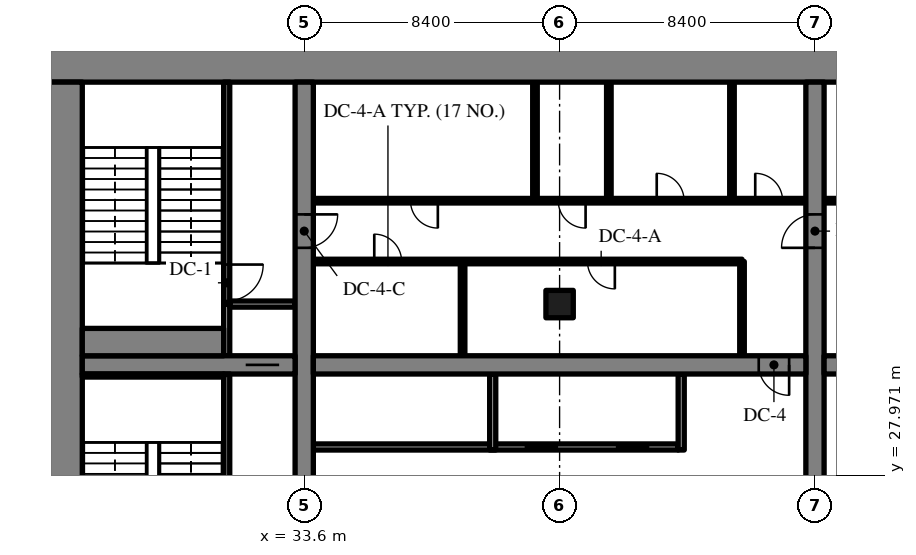
"""IFC4 building model, lengths in metres.
Left out: names, types, materials, properties, quantities, classifications, styles, units other than length and angle.
Written with IfcOpenShell. Run it as: python <this file> out.ifc"""

import sys

from ifc_helpers import new_model, si_unit, direction, frame, frame_2d, origin, origin_2d, place, context, subcontext, project, spatial, rectangle, extrude, source, transform, mapped, element, fill, save


model = new_model("IFC4")
c1 = context("Model", 3, precision=1e-05, world=origin(), true_north=direction((0.0, 1.0)))
c2 = subcontext(c1, "Body", "Model", "MODEL_VIEW")
j1 = project(units=[si_unit("LENGTHUNIT", "METRE"), si_unit("PLANEANGLEUNIT", "RADIAN")], contexts=[c1])
p1 = place(None, origin())
s1 = spatial("IfcSite", under=j1, at=p1, CompositionType="ELEMENT")
p2 = place(p1, origin())
s2 = spatial("IfcBuilding", under=s1, at=p2, CompositionType="ELEMENT")
p3 = place(p2, frame((0.0, 0.0, -4.5)))
s3 = spatial("IfcBuildingStorey", under=s2, at=p3, CompositionType="ELEMENT", Elevation=-4.5)
m1 = source(origin(), c2, "Body", "SweptSolid", [
    extrude(rectangle(XDim=50.4, YDim=1.1, at=frame_2d((25.2, 0.0))), origin(), (0.0, 0.0, 1.0), 4.22),
])
p4 = place(p3, frame((25.2, 41.45, 0.0), z_axis=(0.0, 0.0, 1.0), x_axis=(1.0, 0.0, 0.0)))
e1 = element("IfcWall", 1, at=p4, inside=s3, PredefinedType="SHEAR", context=c2, shape_type="MappedRepresentation", body=[
    mapped(m1, transform((0.0, 0.0, 0.0), scale=1.0)),
])
m2 = source(origin(), c2, "Body", "SweptSolid", [
    extrude(rectangle(XDim=17.8, YDim=1.1, at=frame_2d((8.9, 0.0))), origin(), (0.0, 0.0, 1.0), 4.22),
])
p5 = place(p3, frame((25.75, 23.1, 0.0), z_axis=(0.0, 0.0, 1.0), x_axis=(0.0, 1.0, 0.0)))
e2 = element("IfcWall", 2, at=p5, inside=s3, PredefinedType="SHEAR", context=c2, shape_type="MappedRepresentation", body=[
    mapped(m2, transform((0.0, 0.0, 0.0), scale=1.0)),
])
m3 = source(origin(), c2, "Body", "SweptSolid", [
    extrude(rectangle(XDim=17.8, YDim=0.6, at=frame_2d((8.9, 0.0))), origin(), (0.0, 0.0, 1.0), 4.22),
])
p6 = place(p3, frame((33.6, 23.1, 0.0), z_axis=(0.0, 0.0, 1.0), x_axis=(0.0, 1.0, 0.0)))
e3 = element("IfcWall", 3, at=p6, inside=s3, PredefinedType="SHEAR", context=c2, shape_type="MappedRepresentation", body=[
    mapped(m3, transform((0.0, 0.0, 0.0), scale=1.0)),
])
m4 = source(origin(), c2, "Body", "SweptSolid", [
    extrude(rectangle(XDim=1.1, YDim=2.1, at=frame_2d((0.55, 1.05))), frame((0.0, 0.31, 0.0), z_axis=(0.0, -1.0, 0.0), x_axis=(1.0, 0.0, 0.0)), (0.0, 0.0, 1.0), 0.62),
])
p7 = place(p6, frame((12.35, 0.0, 0.0)))
e4 = element("IfcOpeningElement", 4, at=p7, cuts=e3, PredefinedType="OPENING", context=c2, shape_type="MappedRepresentation", body=[
    mapped(m4, transform((0.0, 0.0, 0.0), scale=1.0)),
])
p8 = place(p3, frame((50.4, 23.1, 0.0), z_axis=(0.0, 0.0, 1.0), x_axis=(0.0, 1.0, 0.0)))
e5 = element("IfcWall", 5, at=p8, inside=s3, PredefinedType="SHEAR", context=c2, shape_type="MappedRepresentation", body=[
    mapped(m3, transform((0.0, 0.0, 0.0), scale=1.0)),
])
p9 = place(p8, frame((12.35, 0.0, 0.0)))
e6 = element("IfcOpeningElement", 6, at=p9, cuts=e5, PredefinedType="OPENING", context=c2, shape_type="MappedRepresentation", body=[
    mapped(m4, transform((0.0, 0.0, 0.0), scale=1.0)),
])
m5 = source(origin(), c2, "Body", "SweptSolid", [
    extrude(rectangle(XDim=7.0, YDim=0.6, at=frame_2d((3.5, 0.0))), origin(), (0.0, 0.0, 1.0), 4.22),
])
p10 = place(p3, frame((26.3, 31.6, 0.0), z_axis=(0.0, 0.0, 1.0), x_axis=(1.0, 0.0, 0.0)))
e7 = element("IfcWall", 7, at=p10, inside=s3, PredefinedType="SHEAR", context=c2, shape_type="MappedRepresentation", body=[
    mapped(m5, transform((0.0, 0.0, 0.0), scale=1.0)),
])
p11 = place(p10, frame((5.375, 0.0, 0.0)))
e8 = element("IfcOpeningElement", 8, at=p11, cuts=e7, PredefinedType="OPENING", context=c2, shape_type="MappedRepresentation", body=[
    mapped(m4, transform((0.0, 0.0, 0.0), scale=1.0)),
])
m6 = source(origin(), c2, "Body", "SweptSolid", [
    extrude(rectangle(XDim=16.2, YDim=0.6, at=frame_2d((8.1, 0.0))), origin(), (0.0, 0.0, 1.0), 4.22),
])
p12 = place(p3, frame((33.9, 31.6, 0.0), z_axis=(0.0, 0.0, 1.0), x_axis=(1.0, 0.0, 0.0)))
e9 = element("IfcWall", 9, at=p12, inside=s3, PredefinedType="SHEAR", context=c2, shape_type="MappedRepresentation", body=[
    mapped(m6, transform((0.0, 0.0, 0.0), scale=1.0)),
])
m7 = source(origin(), c2, "Body", "SweptSolid", [
    extrude(rectangle(XDim=1.0, YDim=2.1, at=frame_2d((0.5, 1.05))), frame((0.0, 0.31, 0.0), z_axis=(0.0, -1.0, 0.0), x_axis=(1.0, 0.0, 0.0)), (0.0, 0.0, 1.0), 0.62),
])
p13 = place(p12, frame((14.65, 0.0, 0.0)))
e10 = element("IfcOpeningElement", 10, at=p13, cuts=e9, PredefinedType="OPENING", context=c2, shape_type="MappedRepresentation", body=[
    mapped(m7, transform((0.0, 0.0, 0.0), scale=1.0)),
])
m8 = source(origin(), c2, "Body", "SweptSolid", [
    extrude(rectangle(XDim=16.2, YDim=0.6, at=frame_2d((8.1, 0.0))), origin(), (0.0, 0.0, 1.0), 4.22),
])
p14 = place(p3, frame((50.7, 31.6, 0.0), z_axis=(0.0, 0.0, 1.0), x_axis=(1.0, 0.0, 0.0)))
e11 = element("IfcWall", 11, at=p14, inside=s3, PredefinedType="SHEAR", context=c2, shape_type="MappedRepresentation", body=[
    mapped(m8, transform((0.0, 0.0, 0.0), scale=1.0)),
])
p15 = place(p14, frame((0.55, 0.0, 0.0)))
e12 = element("IfcOpeningElement", 12, at=p15, cuts=e11, PredefinedType="OPENING", context=c2, shape_type="MappedRepresentation", body=[
    mapped(m7, transform((0.0, 0.0, 0.0), scale=1.0)),
])
m9 = source(origin(), c2, "Body", "SweptSolid", [
    extrude(rectangle(XDim=0.9, YDim=0.9, at=origin_2d()), origin(), (0.0, 0.0, 1.0), 4.22),
])
p16 = place(p3, frame((42.0, 33.6, 0.0), z_axis=(0.0, 0.0, 1.0), x_axis=(1.0, 0.0, 0.0)))
e13 = element("IfcColumn", 13, at=p16, inside=s3, PredefinedType="COLUMN", context=c2, shape_type="MappedRepresentation", body=[
    mapped(m9, transform((0.0, 0.0, 0.0), scale=1.0)),
])
m10 = source(origin(), c2, "Body", "SweptSolid", [
    extrude(rectangle(XDim=12.0, YDim=0.2, at=frame_2d((6.0, 0.0))), origin(), (0.0, 0.0, 1.0), 4.22),
])
p17 = place(p3, frame((33.9, 28.9, 0.0), z_axis=(0.0, 0.0, 1.0), x_axis=(1.0, 0.0, 0.0)))
e14 = element("IfcWall", 14, at=p17, inside=s3, PredefinedType="SOLIDWALL", context=c2, shape_type="MappedRepresentation", body=[
    mapped(m10, transform((0.0, 0.0, 0.0), scale=1.0)),
])
m11 = source(origin(), c2, "Body", "SweptSolid", [
    extrude(rectangle(XDim=1.1, YDim=2.1, at=frame_2d((0.55, 1.05))), frame((0.0, 0.11, 0.0), z_axis=(0.0, -1.0, 0.0), x_axis=(1.0, 0.0, 0.0)), (0.0, 0.0, 1.0), 0.22),
])
p18 = place(p17, frame((6.95, 0.0, 0.0)))
e15 = element("IfcOpeningElement", 15, at=p18, cuts=e14, PredefinedType="OPENING", context=c2, shape_type="MappedRepresentation", body=[
    mapped(m11, transform((0.0, 0.0, 0.0), scale=1.0)),
])
p19 = place(p17, frame((9.95, 0.0, 0.0)))
e16 = element("IfcOpeningElement", 16, at=p19, cuts=e14, PredefinedType="OPENING", context=c2, shape_type="MappedRepresentation", body=[
    mapped(m11, transform((0.0, 0.0, 0.0), scale=1.0)),
])
m12 = source(origin(), c2, "Body", "SweptSolid", [
    extrude(rectangle(XDim=2.5, YDim=0.2, at=frame_2d((1.25, 0.0))), origin(), (0.0, 0.0, 1.0), 4.22),
])
for number, where, z_axis, x_axis in (
    (17, (46.0, 28.8, 0.0), (0.0, 0.0, 1.0), (0.0, 1.0, 0.0)),
    (18, (39.8, 28.8, 0.0), (0.0, 0.0, 1.0), (0.0, 1.0, 0.0)),
):
    element("IfcWall", number, at=place(p3, frame(where, z_axis=z_axis, x_axis=x_axis)), inside=s3, PredefinedType="SOLIDWALL", context=c2, shape_type="MappedRepresentation", body=[
        mapped(m12, transform((0.0, 0.0, 0.0), scale=1.0)),
    ])
m13 = source(origin(), c2, "Body", "SweptSolid", [
    extrude(rectangle(XDim=3.1, YDim=0.15, at=frame_2d((1.55, 0.0))), origin(), (0.0, 0.0, 1.0), 4.22),
])
p20 = place(p3, frame((48.0, 31.9, 0.0), z_axis=(0.0, 0.0, 1.0), x_axis=(0.0, 1.0, 0.0)))
e19 = element("IfcWall", 19, at=p20, inside=s3, PredefinedType="PARTITIONING", context=c2, shape_type="MappedRepresentation", body=[
    mapped(m13, transform((0.0, 0.0, 0.0), scale=1.0)),
])
m14 = source(origin(), c2, "Body", "SweptSolid", [
    extrude(rectangle(XDim=14.1, YDim=0.15, at=frame_2d((7.05, 0.0))), origin(), (0.0, 0.0, 1.0), 4.22),
])
p21 = place(p3, frame((33.9, 35.0, 0.0), z_axis=(0.0, 0.0, 1.0), x_axis=(1.0, 0.0, 0.0)))
e20 = element("IfcWall", 20, at=p21, inside=s3, PredefinedType="PARTITIONING", context=c2, shape_type="MappedRepresentation", body=[
    mapped(m14, transform((0.0, 0.0, 0.0), scale=1.0)),
])
m15 = source(origin(), c2, "Body", "SweptSolid", [
    extrude(rectangle(XDim=0.9, YDim=2.1, at=frame_2d((0.45, 1.05))), frame((0.0, 0.085, 0.0), z_axis=(0.0, -1.0, 0.0), x_axis=(1.0, 0.0, 0.0)), (0.0, 0.0, 1.0), 0.17),
])
p22 = place(p21, frame((2.004, 0.0, 0.0)))
e21 = element("IfcOpeningElement", 21, at=p22, cuts=e20, PredefinedType="OPENING", context=c2, shape_type="MappedRepresentation", body=[
    mapped(m15, transform((0.0, 0.0, 0.0), scale=1.0)),
])
p23 = place(p21, frame((9.017, 0.0, 0.0)))
e22 = element("IfcOpeningElement", 22, at=p23, cuts=e20, PredefinedType="OPENING", context=c2, shape_type="MappedRepresentation", body=[
    mapped(m15, transform((0.0, 0.0, 0.0), scale=1.0)),
])
m16 = source(origin(), c2, "Body", "SweptSolid", [
    extrude(rectangle(XDim=16.2, YDim=0.15, at=frame_2d((8.1, 0.0))), origin(), (0.0, 0.0, 1.0), 4.22),
])
p24 = place(p3, frame((33.9, 37.0, 0.0), z_axis=(0.0, 0.0, 1.0), x_axis=(1.0, 0.0, 0.0)))
e23 = element("IfcWall", 23, at=p24, inside=s3, PredefinedType="PARTITIONING", context=c2, shape_type="MappedRepresentation", body=[
    mapped(m16, transform((0.0, 0.0, 0.0), scale=1.0)),
])
p25 = place(p24, frame((3.195, 0.0, 0.0)))
e24 = element("IfcOpeningElement", 24, at=p25, cuts=e23, PredefinedType="OPENING", context=c2, shape_type="MappedRepresentation", body=[
    mapped(m15, transform((0.0, 0.0, 0.0), scale=1.0)),
])
p26 = place(p24, frame((8.055, 0.0, 0.0)))
e25 = element("IfcOpeningElement", 25, at=p26, cuts=e23, PredefinedType="OPENING", context=c2, shape_type="MappedRepresentation", body=[
    mapped(m15, transform((0.0, 0.0, 0.0), scale=1.0)),
])
p27 = place(p24, frame((11.295, 0.0, 0.0)))
e26 = element("IfcOpeningElement", 26, at=p27, cuts=e23, PredefinedType="OPENING", context=c2, shape_type="MappedRepresentation", body=[
    mapped(m15, transform((0.0, 0.0, 0.0), scale=1.0)),
])
p28 = place(p24, frame((14.535, 0.0, 0.0)))
e27 = element("IfcOpeningElement", 27, at=p28, cuts=e23, PredefinedType="OPENING", context=c2, shape_type="MappedRepresentation", body=[
    mapped(m15, transform((0.0, 0.0, 0.0), scale=1.0)),
])
p29 = place(p3, frame((38.809, 31.9, 0.0), z_axis=(0.0, 0.0, 1.0), x_axis=(0.0, 1.0, 0.0)))
e28 = element("IfcWall", 28, at=p29, inside=s3, PredefinedType="PARTITIONING", context=c2, shape_type="MappedRepresentation", body=[
    mapped(m13, transform((0.0, 0.0, 0.0), scale=1.0)),
])
m17 = source(origin(), c2, "Body", "SweptSolid", [
    extrude(rectangle(XDim=3.9, YDim=0.15, at=frame_2d((1.95, 0.0))), origin(), (0.0, 0.0, 1.0), 4.22),
])
for number, where, z_axis, x_axis in (
    (29, (41.19, 37.0, 0.0), (0.0, 0.0, 1.0), (0.0, 1.0, 0.0)),
    (30, (43.62, 37.0, 0.0), (0.0, 0.0, 1.0), (0.0, 1.0, 0.0)),
    (31, (47.67, 37.0, 0.0), (0.0, 0.0, 1.0), (0.0, 1.0, 0.0)),
):
    element("IfcWall", number, at=place(p3, frame(where, z_axis=z_axis, x_axis=x_axis)), inside=s3, PredefinedType="PARTITIONING", context=c2, shape_type="MappedRepresentation", body=[
        mapped(m17, transform((0.0, 0.0, 0.0), scale=1.0)),
    ])
m18 = source(origin(), c2, "Body", "SweptSolid", [
    extrude(rectangle(XDim=16.2, YDim=0.15, at=frame_2d((8.1, 0.0))), origin(), (0.0, 0.0, 1.0), 4.22),
])
p30 = place(p3, frame((66.9, 37.0, 0.0), z_axis=(0.0, 0.0, 1.0), x_axis=(-1.0, 0.0, 0.0)))
e32 = element("IfcWall", 32, at=p30, inside=s3, PredefinedType="PARTITIONING", context=c2, shape_type="MappedRepresentation", body=[
    mapped(m18, transform((0.0, 0.0, 0.0), scale=1.0)),
])
p31 = place(p30, frame((0.765, 0.0, 0.0)))
e33 = element("IfcOpeningElement", 33, at=p31, cuts=e32, PredefinedType="OPENING", context=c2, shape_type="MappedRepresentation", body=[
    mapped(m15, transform((0.0, 0.0, 0.0), scale=1.0)),
])
p32 = place(p30, frame((3.6, 0.0, 0.0)))
e34 = element("IfcOpeningElement", 34, at=p32, cuts=e32, PredefinedType="OPENING", context=c2, shape_type="MappedRepresentation", body=[
    mapped(m15, transform((0.0, 0.0, 0.0), scale=1.0)),
])
p33 = place(p30, frame((9.27, 0.0, 0.0)))
e35 = element("IfcOpeningElement", 35, at=p33, cuts=e32, PredefinedType="OPENING", context=c2, shape_type="MappedRepresentation", body=[
    mapped(m15, transform((0.0, 0.0, 0.0), scale=1.0)),
])
p34 = place(p30, frame((14.535, 0.0, 0.0)))
e36 = element("IfcOpeningElement", 36, at=p34, cuts=e32, PredefinedType="OPENING", context=c2, shape_type="MappedRepresentation", body=[
    mapped(m15, transform((0.0, 0.0, 0.0), scale=1.0)),
])
m19 = source(origin(), c2, "Body", "SweptSolid", [
    extrude(rectangle(XDim=8.2, YDim=0.2, at=frame_2d((4.1, 0.0))), origin(), (0.0, 0.0, 1.0), 4.22),
])
p35 = place(p3, frame((31.05, 23.1, 0.0), z_axis=(0.0, 0.0, 1.0), x_axis=(0.0, 1.0, 0.0)))
e37 = element("IfcWall", 37, at=p35, inside=s3, PredefinedType="SOLIDWALL", context=c2, shape_type="MappedRepresentation", body=[
    mapped(m19, transform((0.0, 0.0, 0.0), scale=1.0)),
])
m20 = source(origin(), c2, "Body", "SweptSolid", [
    extrude(rectangle(XDim=1.2, YDim=2.1, at=frame_2d((0.6, 1.05))), frame((0.0, 0.11, 0.0), z_axis=(0.0, -1.0, 0.0), x_axis=(1.0, 0.0, 0.0)), (0.0, 0.0, 1.0), 0.22),
])
p36 = place(p35, frame((0.5, 0.0, 0.0)))
e38 = element("IfcOpeningElement", 38, at=p36, cuts=e37, PredefinedType="OPENING", context=c2, shape_type="MappedRepresentation", body=[
    mapped(m20, transform((0.0, 0.0, 0.0), scale=1.0)),
])
m21 = source(origin(), c2, "Body", "SweptSolid", [
    extrude(rectangle(XDim=1.7, YDim=0.2, at=frame_2d((0.85, 0.0))), origin(), (0.0, 0.0, 1.0), 4.22),
])
p37 = place(p3, frame((31.05, 31.9, 0.0), z_axis=(0.0, 0.0, 1.0), x_axis=(0.0, 1.0, 0.0)))
e39 = element("IfcWall", 39, at=p37, inside=s3, PredefinedType="SOLIDWALL", context=c2, shape_type="MappedRepresentation", body=[
    mapped(m21, transform((0.0, 0.0, 0.0), scale=1.0)),
])
m22 = source(origin(), c2, "Body", "SweptSolid", [
    extrude(rectangle(XDim=2.15, YDim=0.2, at=frame_2d((1.075, 0.0))), origin(), (0.0, 0.0, 1.0), 4.22),
])
p38 = place(p3, frame((31.15, 33.6, 0.0), z_axis=(0.0, 0.0, 1.0), x_axis=(1.0, 0.0, 0.0)))
e40 = element("IfcWall", 40, at=p38, inside=s3, PredefinedType="SOLIDWALL", context=c2, shape_type="MappedRepresentation", body=[
    mapped(m22, transform((0.0, 0.0, 0.0), scale=1.0)),
])
m23 = source(origin(), c2, "Body", "SweptSolid", [
    extrude(rectangle(XDim=7.3, YDim=0.2, at=frame_2d((3.65, 0.0))), origin(), (0.0, 0.0, 1.0), 4.22),
])
p39 = place(p3, frame((31.05, 33.6, 0.0), z_axis=(0.0, 0.0, 1.0), x_axis=(0.0, 1.0, 0.0)))
e41 = element("IfcWall", 41, at=p39, inside=s3, PredefinedType="SOLIDWALL", context=c2, shape_type="MappedRepresentation", body=[
    mapped(m23, transform((0.0, 0.0, 0.0), scale=1.0)),
])
p40 = place(p39, frame((0.1, 0.0, 0.0)))
e42 = element("IfcOpeningElement", 42, at=p40, cuts=e41, PredefinedType="OPENING", context=c2, shape_type="MappedRepresentation", body=[
    mapped(m20, transform((0.0, 0.0, 0.0), scale=1.0)),
])
m24 = source(origin(), c2, "Body", "SweptSolid", [
    extrude(rectangle(XDim=4.65, YDim=0.1, at=frame_2d((2.325, 0.0))), origin(), (0.0, 0.0, 1.0), 4.22),
])
p41 = place(p3, frame((26.3, 31.25, 0.0), z_axis=(0.0, 0.0, 1.0), x_axis=(1.0, 0.0, 0.0)))
e43 = element("IfcWall", 43, at=p41, inside=s3, PredefinedType="SOLIDWALL", context=c2, shape_type="MappedRepresentation", body=[
    mapped(m24, transform((0.0, 0.0, 0.0), scale=1.0)),
])
m25 = source(origin(), c2, "Body", "SweptSolid", [
    extrude(rectangle(XDim=4.65, YDim=0.9, at=frame_2d((2.325, 0.0))), origin(), (0.0, 0.0, 1.0), 4.22),
])
p42 = place(p3, frame((26.3, 32.35, 0.0), z_axis=(0.0, 0.0, 1.0), x_axis=(1.0, 0.0, 0.0)))
e44 = element("IfcWall", 44, at=p42, inside=s3, PredefinedType="SOLIDWALL", context=c2, shape_type="MappedRepresentation", body=[
    mapped(m25, transform((0.0, 0.0, 0.0), scale=1.0)),
])
m26 = source(origin(), c2, "Body", "SweptSolid", [
    extrude(rectangle(XDim=1.0, YDim=2.1, at=frame_2d((0.5, 1.05))), frame((0.0, 0.025, 0.0), z_axis=(0.0, -1.0, 0.0), x_axis=(1.0, 0.0, 0.0)), (0.0, 0.0, 1.0), 0.05),
])
p43 = place(p13, origin())
e45 = element("IfcDoor", 45, at=p43, inside=s3, OperationType="SINGLE_SWING_RIGHT", PredefinedType="DOOR", context=c2, shape_type="MappedRepresentation", body=[
    mapped(m26, transform((0.0, 0.0, 0.0), scale=1.0)),
])
fill(e10, e45)
m27 = source(origin(), c2, "Body", "SweptSolid", [
    extrude(rectangle(XDim=1.1, YDim=2.1, at=frame_2d((0.55, 1.05))), frame((0.0, 0.025, 0.0), z_axis=(0.0, -1.0, 0.0), x_axis=(1.0, 0.0, 0.0)), (0.0, 0.0, 1.0), 0.05),
])
p44 = place(p18, origin())
e46 = element("IfcDoor", 46, at=p44, inside=s3, OperationType="SLIDING_TO_LEFT", PredefinedType="DOOR", context=c2, shape_type="MappedRepresentation", body=[
    mapped(m27, transform((0.0, 0.0, 0.0), scale=1.0)),
])
fill(e15, e46)
p45 = place(p19, origin())
e47 = element("IfcDoor", 47, at=p45, inside=s3, OperationType="SLIDING_TO_RIGHT", PredefinedType="DOOR", context=c2, shape_type="MappedRepresentation", body=[
    mapped(m27, transform((0.0, 0.0, 0.0), scale=1.0)),
])
fill(e16, e47)
m28 = source(origin(), c2, "Body", "SweptSolid", [
    extrude(rectangle(XDim=0.9, YDim=2.1, at=frame_2d((0.45, 1.05))), frame((0.0, 0.025, 0.0), z_axis=(0.0, -1.0, 0.0), x_axis=(1.0, 0.0, 0.0)), (0.0, 0.0, 1.0), 0.05),
])
p46 = place(p22, origin())
e48 = element("IfcDoor", 48, at=p46, inside=s3, OperationType="SINGLE_SWING_LEFT", PredefinedType="DOOR", context=c2, shape_type="MappedRepresentation", body=[
    mapped(m28, transform((0.0, 0.0, 0.0), scale=1.0)),
])
fill(e21, e48)
p47 = place(p23, origin())
e49 = element("IfcDoor", 49, at=p47, inside=s3, OperationType="SINGLE_SWING_RIGHT", PredefinedType="DOOR", context=c2, shape_type="MappedRepresentation", body=[
    mapped(m28, transform((0.0, 0.0, 0.0), scale=1.0)),
])
fill(e22, e49)
p48 = place(p25, origin())
e50 = element("IfcDoor", 50, at=p48, inside=s3, OperationType="SINGLE_SWING_RIGHT", PredefinedType="DOOR", context=c2, shape_type="MappedRepresentation", body=[
    mapped(m28, transform((0.0, 0.0, 0.0), scale=1.0)),
])
fill(e24, e50)
p49 = place(p26, origin())
e51 = element("IfcDoor", 51, at=p49, inside=s3, OperationType="SINGLE_SWING_RIGHT", PredefinedType="DOOR", context=c2, shape_type="MappedRepresentation", body=[
    mapped(m28, transform((0.0, 0.0, 0.0), scale=1.0)),
])
fill(e25, e51)
p50 = place(p27, origin())
e52 = element("IfcDoor", 52, at=p50, inside=s3, OperationType="SINGLE_SWING_LEFT", PredefinedType="DOOR", context=c2, shape_type="MappedRepresentation", body=[
    mapped(m28, transform((0.0, 0.0, 0.0), scale=1.0)),
])
fill(e26, e52)
p51 = place(p28, origin())
e53 = element("IfcDoor", 53, at=p51, inside=s3, OperationType="SINGLE_SWING_LEFT", PredefinedType="DOOR", context=c2, shape_type="MappedRepresentation", body=[
    mapped(m28, transform((0.0, 0.0, 0.0), scale=1.0)),
])
fill(e27, e53)
p52 = place(p11, origin())
e54 = element("IfcDoor", 54, at=p52, inside=s3, OperationType="SLIDING_TO_RIGHT", PredefinedType="DOOR", context=c2, shape_type="MappedRepresentation", body=[
    mapped(m27, transform((0.0, 0.0, 0.0), scale=1.0)),
])
fill(e8, e54)
m29 = source(origin(), c2, "Body", "SweptSolid", [
    extrude(rectangle(XDim=1.2, YDim=2.1, at=frame_2d((0.6, 1.05))), frame((0.0, 0.025, 0.0), z_axis=(0.0, -1.0, 0.0), x_axis=(1.0, 0.0, 0.0)), (0.0, 0.0, 1.0), 0.05),
])
p53 = place(p40, origin())
e55 = element("IfcDoor", 55, at=p53, inside=s3, OperationType="SINGLE_SWING_RIGHT", PredefinedType="DOOR", context=c2, shape_type="MappedRepresentation", body=[
    mapped(m29, transform((0.0, 0.0, 0.0), scale=1.0)),
])
fill(e42, e55)
p54 = place(p7, origin())
e56 = element("IfcDoor", 56, at=p54, inside=s3, OperationType="SINGLE_SWING_RIGHT", PredefinedType="DOOR", context=c2, shape_type="MappedRepresentation", body=[
    mapped(m27, transform((0.0, 0.0, 0.0), scale=1.0)),
])
fill(e4, e56)
p55 = place(p9, origin())
e57 = element("IfcDoor", 57, at=p55, inside=s3, OperationType="SINGLE_SWING_LEFT", PredefinedType="DOOR", context=c2, shape_type="MappedRepresentation", body=[
    mapped(m27, transform((0.0, 0.0, 0.0), scale=1.0)),
])
fill(e6, e57)
save(model, sys.argv[1])
